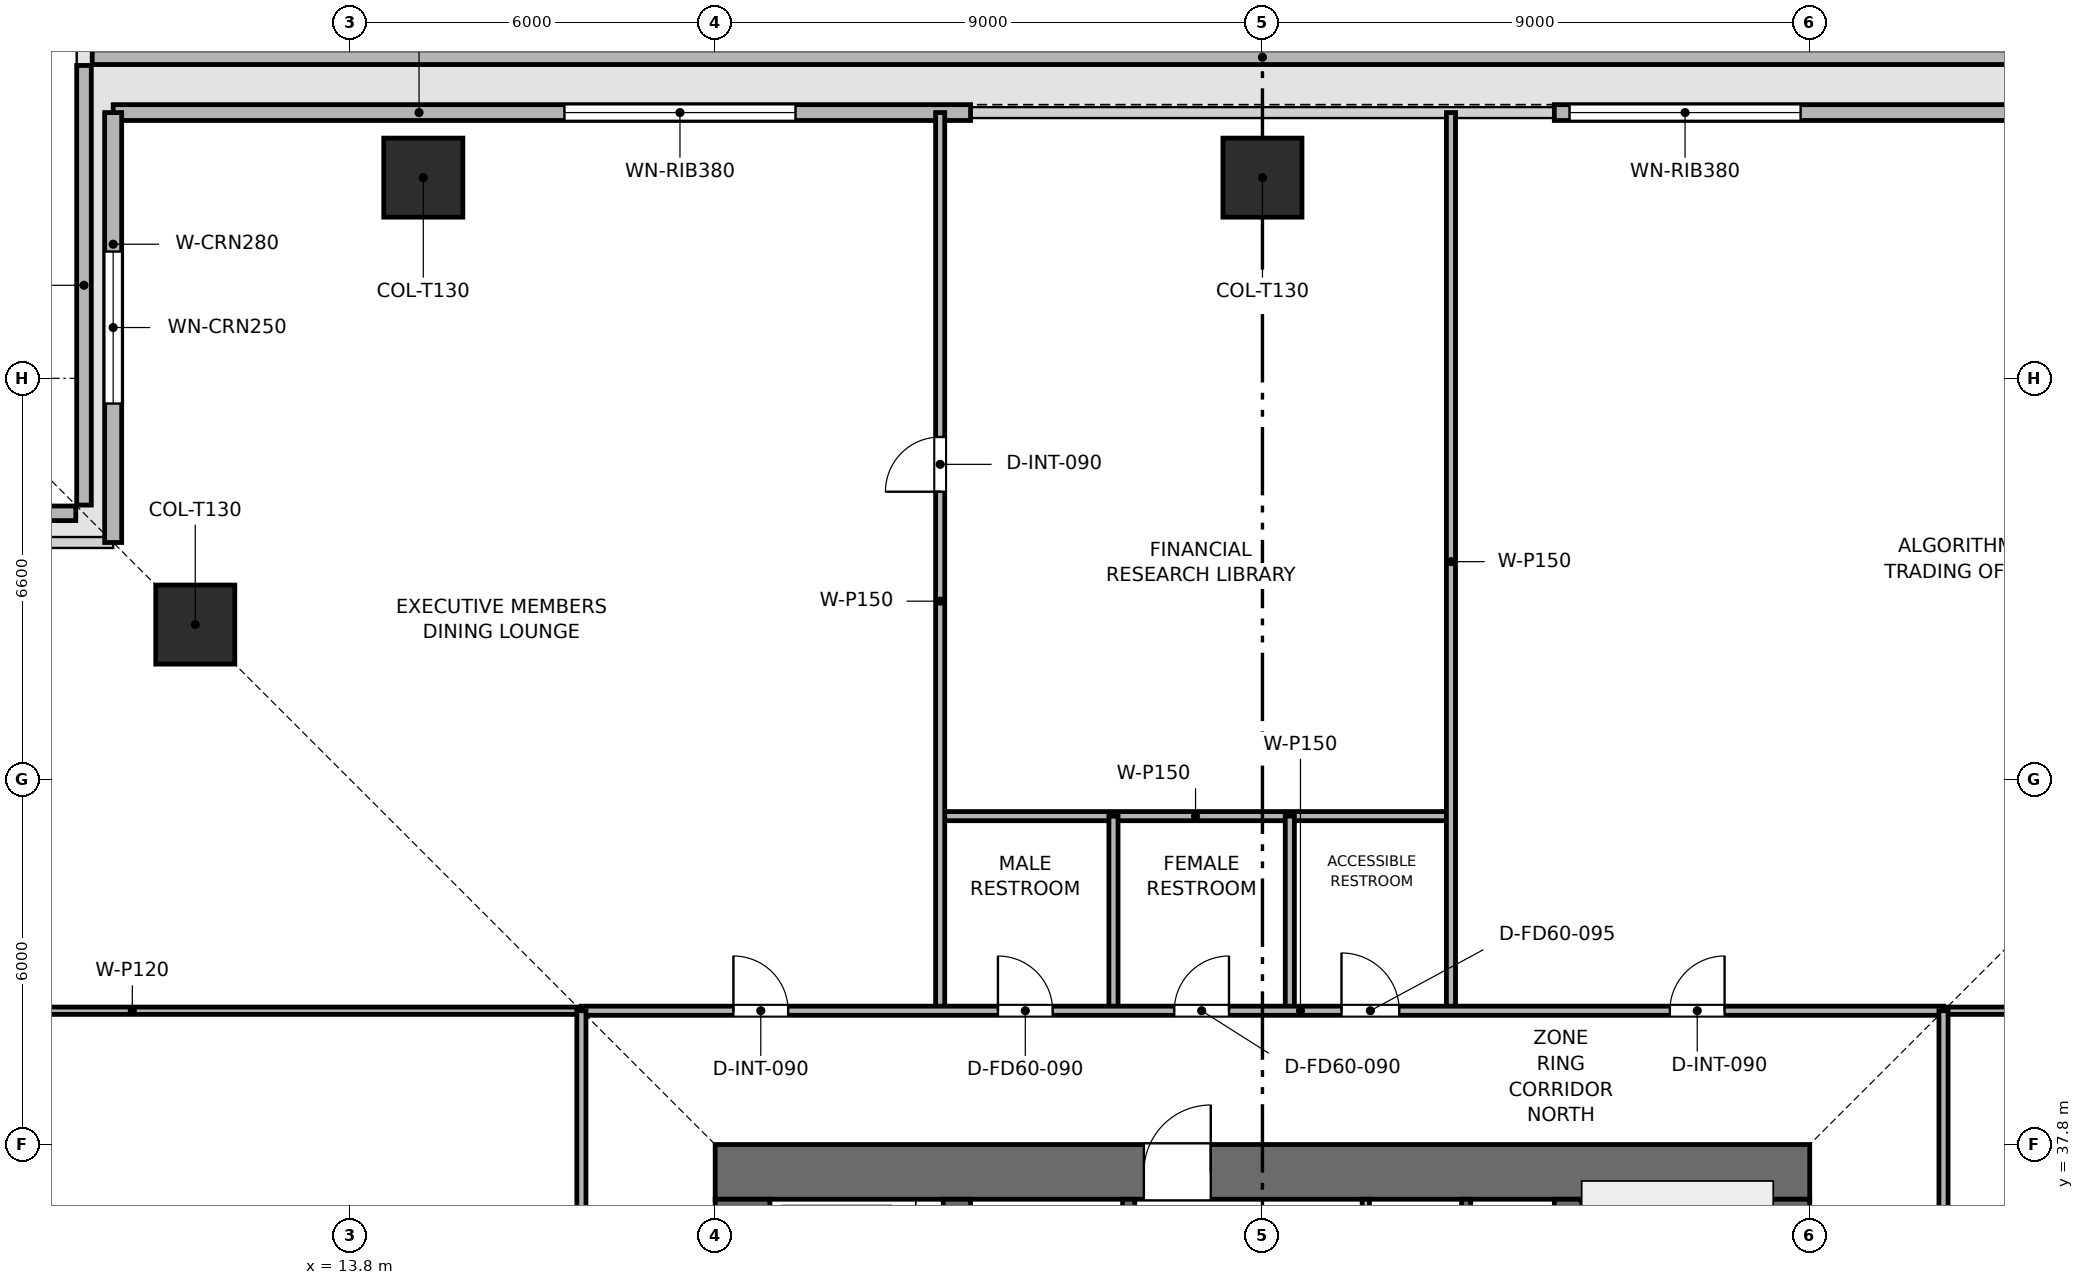
"""IFC4 building model, lengths in metres.
Left out: names, types, materials, properties, quantities, classifications, styles, units other than length and angle.
Written with IfcOpenShell. Run it as: python <this file> out.ifc"""

import sys

from ifc_helpers import new_model, si_unit, direction, frame, frame_2d, origin, origin_2d, place, context, subcontext, project, spatial, rectangle, extrude, element, fill, save


model = new_model("IFC4")
c1 = context("Model", 3, precision=1e-05, world=origin(), true_north=direction((0.0, 1.0)))
c2 = subcontext(c1, "Body", "Model", "MODEL_VIEW")
j1 = project(units=[si_unit("LENGTHUNIT", "METRE"), si_unit("PLANEANGLEUNIT", "RADIAN")], contexts=[c1])
p1 = place(None, origin())
s1 = spatial("IfcSite", under=j1, at=p1, CompositionType="ELEMENT")
p2 = place(p1, origin())
s2 = spatial("IfcBuilding", under=s1, at=p2, CompositionType="ELEMENT")
p3 = place(p2, frame((0.0, 0.0, 113.4)))
s3 = spatial("IfcBuildingStorey", under=s2, at=p3, CompositionType="ELEMENT", Elevation=113.4)
p4 = place(p3, frame((19.8, 37.35, 0.0), z_axis=(0.0, 0.0, 1.0), x_axis=(1.0, 0.0, 0.0)))
e1 = element("IfcWall", 1, at=p4, inside=s3, PredefinedType="SHEAR", context=c2, shape_type="SweptSolid", body=[
    extrude(rectangle(XDim=18.0, YDim=0.9, at=frame_2d((9.0, 0.0))), origin(), (0.0, 0.0, 1.0), 3.9),
])
p5 = place(p4, frame((7.05, 0.0, 0.0)))
e2 = element("IfcOpeningElement", 2, at=p5, cuts=e1, PredefinedType="OPENING", context=c2, shape_type="SweptSolid", body=[
    extrude(rectangle(XDim=1.1, YDim=2.15, at=frame_2d((0.55, 1.075))), frame((0.0, 0.46, 0.0), z_axis=(0.0, -1.0, 0.0), x_axis=(1.0, 0.0, 0.0)), (0.0, 0.0, 1.0), 0.92),
])
p6 = place(p3, frame((20.25, 20.7, 0.0), z_axis=(0.0, 0.0, 1.0), x_axis=(0.0, 1.0, 0.0)))
e3 = element("IfcWall", 3, at=p6, inside=s3, PredefinedType="SHEAR", context=c2, shape_type="SweptSolid", body=[
    extrude(rectangle(XDim=16.2, YDim=0.9, at=frame_2d((8.1, 0.0))), origin(), (0.0, 0.0, 1.0), 3.9),
])
p7 = place(p6, frame((10.1, 0.0, 0.0)))
e4 = element("IfcOpeningElement", 4, at=p7, cuts=e3, PredefinedType="OPENING", context=c2, shape_type="SweptSolid", body=[
    extrude(rectangle(XDim=1.1, YDim=2.15, at=frame_2d((0.55, 1.075))), frame((0.0, 0.46, 0.0), z_axis=(0.0, -1.0, 0.0), x_axis=(1.0, 0.0, 0.0)), (0.0, 0.0, 1.0), 0.92),
])
p8 = place(p3, frame((37.35, 20.7, 0.0), z_axis=(0.0, 0.0, 1.0), x_axis=(0.0, 1.0, 0.0)))
e5 = element("IfcWall", 5, at=p8, inside=s3, PredefinedType="SHEAR", context=c2, shape_type="SweptSolid", body=[
    extrude(rectangle(XDim=16.2, YDim=0.9, at=frame_2d((8.1, 0.0))), origin(), (0.0, 0.0, 1.0), 3.9),
])
p9 = place(p8, frame((4.6, 0.0, 0.0)))
e6 = element("IfcOpeningElement", 6, at=p9, cuts=e5, PredefinedType="OPENING", context=c2, shape_type="SweptSolid", body=[
    extrude(rectangle(XDim=1.1, YDim=2.15, at=frame_2d((0.55, 1.075))), frame((0.0, 0.46, 0.0), z_axis=(0.0, -1.0, 0.0), x_axis=(1.0, 0.0, 0.0)), (0.0, 0.0, 1.0), 0.92),
])
for number, where, z_axis, x_axis in (
    (7, (23.775, 20.7, 0.0), (0.0, 0.0, 1.0), (0.0, 1.0, 0.0)),
    (8, (33.825, 20.7, 0.0), (0.0, 0.0, 1.0), (0.0, 1.0, 0.0)),
):
    element("IfcWall", number, at=place(p3, frame(where, z_axis=z_axis, x_axis=x_axis)), inside=s3, PredefinedType="SHEAR", context=c2, shape_type="SweptSolid", body=[
        extrude(rectangle(XDim=16.2, YDim=0.45, at=frame_2d((8.1, 0.0))), origin(), (0.0, 0.0, 1.0), 3.9),
    ])
for number, where, z_axis, x_axis in (
    (9, (28.8, 53.7, 0.003), (0.0, 0.0, 1.0), (1.0, 0.0, 0.0)),
    (10, (15.0, 53.7, 0.003), (0.0, 0.0, 1.0), (1.0, 0.0, 0.0)),
    (11, (11.25, 46.35, 0.003), (0.0, 0.0, 1.0), (1.0, 0.0, 0.0)),
):
    element("IfcColumn", number, at=place(p3, frame(where, z_axis=z_axis, x_axis=x_axis)), inside=s3, PredefinedType="COLUMN", context=c2, shape_type="SweptSolid", body=[
        extrude(rectangle(XDim=1.3, YDim=1.3, at=origin_2d()), origin(), (0.0, 0.0, 1.0), 3.644),
    ])
p10 = place(p3, frame((48.045, 55.68, 0.0), z_axis=(0.0, 0.0, 1.0), x_axis=(-1.0, 0.0, 0.0)))
e12 = element("IfcWall", 12, at=p10, inside=s3, PredefinedType="PARAPET", context=c2, shape_type="SweptSolid", body=[
    extrude(rectangle(XDim=38.49, YDim=0.24, at=frame_2d((19.245, 0.0))), origin(), (0.0, 0.0, 1.0), 1.2),
])
for number, where, z_axis, x_axis in (
    (13, (9.42, 55.545, 0.0), (0.0, 0.0, 1.0), (0.0, -1.0, 0.0)),
    (14, (9.285, 48.18, 0.0), (0.0, 0.0, 1.0), (-1.0, 0.0, 0.0)),
):
    element("IfcWall", number, at=place(p3, frame(where, z_axis=z_axis, x_axis=x_axis)), inside=s3, PredefinedType="PARAPET", context=c2, shape_type="SweptSolid", body=[
        extrude(rectangle(XDim=7.23, YDim=0.24, at=frame_2d((3.615, 0.0))), origin(), (0.0, 0.0, 1.0), 1.2),
    ])
p11 = place(p3, frame((9.9, 54.77, 0.0), z_axis=(0.0, 0.0, 1.0), x_axis=(1.0, 0.0, 0.0)))
e15 = element("IfcWall", 15, at=p11, inside=s3, PredefinedType="SOLIDWALL", context=c2, shape_type="SweptSolid", body=[
    extrude(rectangle(XDim=14.1, YDim=0.26, at=frame_2d((7.05, 0.0))), origin(), (0.0, 0.0, 1.0), 3.65),
])
p12 = place(p11, frame((7.421, 0.0, 0.9)))
e16 = element("IfcOpeningElement", 16, at=p12, cuts=e15, PredefinedType="OPENING", context=c2, shape_type="SweptSolid", body=[
    extrude(rectangle(XDim=3.8, YDim=1.9, at=frame_2d((1.9, 0.95))), frame((0.0, 0.14, 0.0), z_axis=(0.0, -1.0, 0.0), x_axis=(1.0, 0.0, 0.0)), (0.0, 0.0, 1.0), 0.28),
])
p13 = place(p3, frame((33.6, 54.77, 0.0), z_axis=(0.0, 0.0, 1.0), x_axis=(1.0, 0.0, 0.0)))
e17 = element("IfcWall", 17, at=p13, inside=s3, PredefinedType="SOLIDWALL", context=c2, shape_type="SweptSolid", body=[
    extrude(rectangle(XDim=14.1, YDim=0.26, at=frame_2d((7.05, 0.0))), origin(), (0.0, 0.0, 1.0), 3.65),
])
p14 = place(p13, frame((0.25, 0.0, 0.9)))
e18 = element("IfcOpeningElement", 18, at=p14, cuts=e17, PredefinedType="OPENING", context=c2, shape_type="SweptSolid", body=[
    extrude(rectangle(XDim=3.8, YDim=1.9, at=frame_2d((1.9, 0.95))), frame((0.0, 0.14, 0.0), z_axis=(0.0, -1.0, 0.0), x_axis=(1.0, 0.0, 0.0)), (0.0, 0.0, 1.0), 0.28),
])
p15 = place(p3, frame((9.9, 47.7, 0.0), z_axis=(0.0, 0.0, 1.0), x_axis=(0.0, 1.0, 0.0)))
e19 = element("IfcWall", 19, at=p15, inside=s3, PredefinedType="SOLIDWALL", context=c2, shape_type="SweptSolid", body=[
    extrude(rectangle(XDim=7.07, YDim=0.28, at=frame_2d((3.535, 0.0))), origin(), (0.0, 0.0, 1.0), 3.65),
])
p16 = place(p15, frame((2.285, 0.0, 0.9)))
e20 = element("IfcOpeningElement", 20, at=p16, cuts=e19, PredefinedType="OPENING", context=c2, shape_type="SweptSolid", body=[
    extrude(rectangle(XDim=2.5, YDim=1.9, at=frame_2d((1.25, 0.95))), frame((0.0, 0.15, 0.0), z_axis=(0.0, -1.0, 0.0), x_axis=(1.0, 0.0, 0.0)), (0.0, 0.0, 1.0), 0.3),
])
p17 = place(p3, frame((32.15, 34.0, 0.0), z_axis=(0.0, 0.0, 1.0), x_axis=(0.0, 1.0, 0.0)))
e21 = element("IfcWall", 21, at=p17, inside=s3, PredefinedType="SHEAR", context=c2, shape_type="SweptSolid", body=[
    extrude(rectangle(XDim=2.9, YDim=0.15, at=frame_2d((1.45, 0.0))), origin(), (0.0, 0.0, 1.0), 3.65),
])
p18 = place(p3, frame((26.6, 34.0, 0.0), z_axis=(0.0, 0.0, 1.0), x_axis=(0.0, 1.0, 0.0)))
e22 = element("IfcWall", 22, at=p18, inside=s3, PredefinedType="SHEAR", context=c2, shape_type="SweptSolid", body=[
    extrude(rectangle(XDim=2.9, YDim=0.2, at=frame_2d((1.45, 0.0))), origin(), (0.0, 0.0, 1.0), 3.65),
])
p19 = place(p18, frame((0.75, 0.0, 0.0)))
e23 = element("IfcOpeningElement", 23, at=p19, cuts=e22, PredefinedType="OPENING", context=c2, shape_type="SweptSolid", body=[
    extrude(rectangle(XDim=1.1, YDim=2.15, at=frame_2d((0.55, 1.075))), frame((0.0, 0.11, 0.0), z_axis=(0.0, -1.0, 0.0), x_axis=(1.0, 0.0, 0.0)), (0.0, 0.0, 1.0), 0.22),
])
p20 = place(p3, frame((30.5, 33.925, 0.0), z_axis=(0.0, 0.0, 1.0), x_axis=(0.0, 1.0, 0.0)))
e24 = element("IfcWall", 24, at=p20, inside=s3, PredefinedType="PARTITIONING", context=c2, shape_type="SweptSolid", body=[
    extrude(rectangle(XDim=2.975, YDim=0.12, at=frame_2d((1.487, 0.0))), origin(), (0.0, 0.0, 1.0), 3.65),
])
p21 = place(p20, frame((0.85, 0.0, 0.0)))
e25 = element("IfcOpeningElement", 25, at=p21, cuts=e24, PredefinedType="OPENING", context=c2, shape_type="SweptSolid", body=[
    extrude(rectangle(XDim=0.9, YDim=2.1, at=frame_2d((0.45, 1.05))), frame((0.0, 0.07, 0.0), z_axis=(0.0, -1.0, 0.0), x_axis=(1.0, 0.0, 0.0)), (0.0, 0.0, 1.0), 0.14),
])
p22 = place(p3, frame((23.5, 43.2, 0.0), z_axis=(0.0, 0.0, 1.0), x_axis=(1.0, 0.0, 0.0)))
e26 = element("IfcWall", 26, at=p22, inside=s3, PredefinedType="PARTITIONING", context=c2, shape_type="SweptSolid", body=[
    extrude(rectangle(XDim=8.4, YDim=0.15, at=frame_2d((4.2, 0.0))), origin(), (0.0, 0.0, 1.0), 3.185),
])
p23 = place(p3, frame((23.5, 40.0, 0.0), z_axis=(0.0, 0.0, 1.0), x_axis=(0.0, 1.0, 0.0)))
e27 = element("IfcWall", 27, at=p23, inside=s3, PredefinedType="PARTITIONING", context=c2, shape_type="SweptSolid", body=[
    extrude(rectangle(XDim=14.77, YDim=0.15, at=frame_2d((7.385, 0.0))), origin(), (0.0, 0.0, 1.0), 3.035),
])
p24 = place(p23, frame((8.535, 0.0, 0.0)))
e28 = element("IfcOpeningElement", 28, at=p24, cuts=e27, PredefinedType="OPENING", context=c2, shape_type="SweptSolid", body=[
    extrude(rectangle(XDim=0.9, YDim=2.1, at=frame_2d((0.45, 1.05))), frame((0.0, 0.085, 0.0), z_axis=(0.0, -1.0, 0.0), x_axis=(1.0, 0.0, 0.0)), (0.0, 0.0, 1.0), 0.17),
])
p25 = place(p3, frame((31.9, 40.0, 0.0), z_axis=(0.0, 0.0, 1.0), x_axis=(0.0, 1.0, 0.0)))
e29 = element("IfcWall", 29, at=p25, inside=s3, PredefinedType="PARTITIONING", context=c2, shape_type="SweptSolid", body=[
    extrude(rectangle(XDim=14.77, YDim=0.15, at=frame_2d((7.385, 0.0))), origin(), (0.0, 0.0, 1.0), 3.035),
])
for number, where, z_axis, x_axis in (
    (30, (26.35, 40.0, 0.0), (0.0, 0.0, 1.0), (0.0, 1.0, 0.0)),
    (31, (29.25, 40.0, 0.0), (0.0, 0.0, 1.0), (0.0, 1.0, 0.0)),
):
    element("IfcWall", number, at=place(p3, frame(where, z_axis=z_axis, x_axis=x_axis)), inside=s3, PredefinedType="PARTITIONING", context=c2, shape_type="SweptSolid", body=[
        extrude(rectangle(XDim=3.2, YDim=0.15, at=frame_2d((1.6, 0.0))), origin(), (0.0, 0.0, 1.0), 3.65),
    ])
for number, where, z_axis, x_axis in (
    (32, (2.83, 40.0, 0.0), (0.0, 0.0, 1.0), (1.0, 0.0, 0.0)),
    (33, (40.0, 40.0, 0.0), (0.0, 0.0, 1.0), (1.0, 0.0, 0.0)),
):
    element("IfcWall", number, at=place(p3, frame(where, z_axis=z_axis, x_axis=x_axis)), inside=s3, PredefinedType="PARTITIONING", context=c2, shape_type="SweptSolid", body=[
        extrude(rectangle(XDim=14.77, YDim=0.12, at=frame_2d((7.385, 0.0))), origin(), (0.0, 0.0, 1.0), 3.035),
    ])
p26 = place(p3, frame((17.6, 40.0, 0.0), z_axis=(0.0, 0.0, 1.0), x_axis=(1.0, 0.0, 0.0)))
e34 = element("IfcWall", 34, at=p26, inside=s3, PredefinedType="PARTITIONING", context=c2, shape_type="SweptSolid", body=[
    extrude(rectangle(XDim=22.4, YDim=0.15, at=frame_2d((11.2, 0.0))), origin(), (0.0, 0.0, 1.0), 3.185),
])
p27 = place(p26, frame((2.5, 0.0, 0.0)))
e35 = element("IfcOpeningElement", 35, at=p27, cuts=e34, PredefinedType="OPENING", context=c2, shape_type="SweptSolid", body=[
    extrude(rectangle(XDim=0.9, YDim=2.1, at=frame_2d((0.45, 1.05))), frame((0.0, 0.085, 0.0), z_axis=(0.0, -1.0, 0.0), x_axis=(1.0, 0.0, 0.0)), (0.0, 0.0, 1.0), 0.17),
])
p28 = place(p26, frame((6.85, 0.0, 0.0)))
e36 = element("IfcOpeningElement", 36, at=p28, cuts=e34, PredefinedType="OPENING", context=c2, shape_type="SweptSolid", body=[
    extrude(rectangle(XDim=0.9, YDim=2.1, at=frame_2d((0.45, 1.05))), frame((0.0, 0.085, 0.0), z_axis=(0.0, -1.0, 0.0), x_axis=(1.0, 0.0, 0.0)), (0.0, 0.0, 1.0), 0.17),
])
p29 = place(p26, frame((9.75, 0.0, 0.0)))
e37 = element("IfcOpeningElement", 37, at=p29, cuts=e34, PredefinedType="OPENING", context=c2, shape_type="SweptSolid", body=[
    extrude(rectangle(XDim=0.9, YDim=2.1, at=frame_2d((0.45, 1.05))), frame((0.0, 0.085, 0.0), z_axis=(0.0, -1.0, 0.0), x_axis=(1.0, 0.0, 0.0)), (0.0, 0.0, 1.0), 0.17),
])
p30 = place(p26, frame((12.5, 0.0, 0.0)))
e38 = element("IfcOpeningElement", 38, at=p30, cuts=e34, PredefinedType="OPENING", context=c2, shape_type="SweptSolid", body=[
    extrude(rectangle(XDim=0.95, YDim=2.1, at=frame_2d((0.475, 1.05))), frame((0.0, 0.085, 0.0), z_axis=(0.0, -1.0, 0.0), x_axis=(1.0, 0.0, 0.0)), (0.0, 0.0, 1.0), 0.17),
])
p31 = place(p26, frame((17.9, 0.0, 0.0)))
e39 = element("IfcOpeningElement", 39, at=p31, cuts=e34, PredefinedType="OPENING", context=c2, shape_type="SweptSolid", body=[
    extrude(rectangle(XDim=0.9, YDim=2.1, at=frame_2d((0.45, 1.05))), frame((0.0, 0.085, 0.0), z_axis=(0.0, -1.0, 0.0), x_axis=(1.0, 0.0, 0.0)), (0.0, 0.0, 1.0), 0.17),
])
p32 = place(p3, frame((17.6, 17.6, 0.0), z_axis=(0.0, 0.0, 1.0), x_axis=(0.0, 1.0, 0.0)))
e40 = element("IfcWall", 40, at=p32, inside=s3, PredefinedType="PARTITIONING", context=c2, shape_type="SweptSolid", body=[
    extrude(rectangle(XDim=22.4, YDim=0.15, at=frame_2d((11.2, 0.0))), origin(), (0.0, 0.0, 1.0), 3.185),
])
p33 = place(p32, frame((4.616, 0.0, 0.0)))
e41 = element("IfcOpeningElement", 41, at=p33, cuts=e40, PredefinedType="OPENING", context=c2, shape_type="SweptSolid", body=[
    extrude(rectangle(XDim=0.9, YDim=2.1, at=frame_2d((0.45, 1.05))), frame((0.0, 0.085, 0.0), z_axis=(0.0, -1.0, 0.0), x_axis=(1.0, 0.0, 0.0)), (0.0, 0.0, 1.0), 0.17),
])
p34 = place(p32, frame((15.816, 0.0, 0.0)))
e42 = element("IfcOpeningElement", 42, at=p34, cuts=e40, PredefinedType="OPENING", context=c2, shape_type="SweptSolid", body=[
    extrude(rectangle(XDim=0.9, YDim=2.1, at=frame_2d((0.45, 1.05))), frame((0.0, 0.085, 0.0), z_axis=(0.0, -1.0, 0.0), x_axis=(1.0, 0.0, 0.0)), (0.0, 0.0, 1.0), 0.17),
])
p35 = place(p3, frame((40.0, 17.6, 0.0), z_axis=(0.0, 0.0, 1.0), x_axis=(0.0, 1.0, 0.0)))
e43 = element("IfcWall", 43, at=p35, inside=s3, PredefinedType="PARTITIONING", context=c2, shape_type="SweptSolid", body=[
    extrude(rectangle(XDim=22.4, YDim=0.15, at=frame_2d((11.2, 0.0))), origin(), (0.0, 0.0, 1.0), 3.185),
])
p36 = place(p35, frame((10.75, 0.0, 0.0)))
e44 = element("IfcOpeningElement", 44, at=p36, cuts=e43, PredefinedType="OPENING", context=c2, shape_type="SweptSolid", body=[
    extrude(rectangle(XDim=0.9, YDim=2.1, at=frame_2d((0.45, 1.05))), frame((0.0, 0.085, 0.0), z_axis=(0.0, -1.0, 0.0), x_axis=(1.0, 0.0, 0.0)), (0.0, 0.0, 1.0), 0.17),
])
p37 = place(p12, origin())
e45 = element("IfcWindow", 45, at=p37, inside=s3, PartitioningType="SINGLE_PANEL", PredefinedType="WINDOW", context=c2, shape_type="SweptSolid", body=[
    extrude(rectangle(XDim=3.8, YDim=1.9, at=frame_2d((1.9, 0.95))), frame((0.0, 0.03, 0.0), z_axis=(0.0, -1.0, 0.0), x_axis=(1.0, 0.0, 0.0)), (0.0, 0.0, 1.0), 0.06),
])
fill(e16, e45)
p38 = place(p14, origin())
e46 = element("IfcWindow", 46, at=p38, inside=s3, PartitioningType="SINGLE_PANEL", PredefinedType="WINDOW", context=c2, shape_type="SweptSolid", body=[
    extrude(rectangle(XDim=3.8, YDim=1.9, at=frame_2d((1.9, 0.95))), frame((0.0, 0.03, 0.0), z_axis=(0.0, -1.0, 0.0), x_axis=(1.0, 0.0, 0.0)), (0.0, 0.0, 1.0), 0.06),
])
fill(e18, e46)
p39 = place(p16, origin())
e47 = element("IfcWindow", 47, at=p39, inside=s3, PartitioningType="SINGLE_PANEL", PredefinedType="WINDOW", context=c2, shape_type="SweptSolid", body=[
    extrude(rectangle(XDim=2.5, YDim=1.9, at=frame_2d((1.25, 0.95))), frame((0.0, 0.03, 0.0), z_axis=(0.0, -1.0, 0.0), x_axis=(1.0, 0.0, 0.0)), (0.0, 0.0, 1.0), 0.06),
])
fill(e20, e47)
p40 = place(p24, origin())
e48 = element("IfcDoor", 48, at=p40, inside=s3, OperationType="SINGLE_SWING_LEFT", PredefinedType="DOOR", context=c2, shape_type="SweptSolid", body=[
    extrude(rectangle(XDim=0.9, YDim=2.1, at=frame_2d((0.45, 1.05))), frame((0.0, 0.025, 0.0), z_axis=(0.0, -1.0, 0.0), x_axis=(1.0, 0.0, 0.0)), (0.0, 0.0, 1.0), 0.05),
])
fill(e28, e48)
p41 = place(p27, origin())
e49 = element("IfcDoor", 49, at=p41, inside=s3, OperationType="SINGLE_SWING_LEFT", PredefinedType="DOOR", context=c2, shape_type="SweptSolid", body=[
    extrude(rectangle(XDim=0.9, YDim=2.1, at=frame_2d((0.45, 1.05))), frame((0.0, 0.025, 0.0), z_axis=(0.0, -1.0, 0.0), x_axis=(1.0, 0.0, 0.0)), (0.0, 0.0, 1.0), 0.05),
])
fill(e35, e49)
p42 = place(p28, origin())
e50 = element("IfcDoor", 50, at=p42, inside=s3, OperationType="SINGLE_SWING_LEFT", PredefinedType="DOOR", context=c2, shape_type="SweptSolid", body=[
    extrude(rectangle(XDim=0.9, YDim=2.1, at=frame_2d((0.45, 1.05))), frame((0.0, 0.025, 0.0), z_axis=(0.0, -1.0, 0.0), x_axis=(1.0, 0.0, 0.0)), (0.0, 0.0, 1.0), 0.05),
])
fill(e36, e50)
p43 = place(p29, origin())
e51 = element("IfcDoor", 51, at=p43, inside=s3, OperationType="SINGLE_SWING_RIGHT", PredefinedType="DOOR", context=c2, shape_type="SweptSolid", body=[
    extrude(rectangle(XDim=0.9, YDim=2.1, at=frame_2d((0.45, 1.05))), frame((0.0, 0.025, 0.0), z_axis=(0.0, -1.0, 0.0), x_axis=(1.0, 0.0, 0.0)), (0.0, 0.0, 1.0), 0.05),
])
fill(e37, e51)
p44 = place(p30, origin())
e52 = element("IfcDoor", 52, at=p44, inside=s3, OperationType="SINGLE_SWING_LEFT", PredefinedType="DOOR", context=c2, shape_type="SweptSolid", body=[
    extrude(rectangle(XDim=0.95, YDim=2.1, at=frame_2d((0.475, 1.05))), frame((0.0, 0.025, 0.0), z_axis=(0.0, -1.0, 0.0), x_axis=(1.0, 0.0, 0.0)), (0.0, 0.0, 1.0), 0.05),
])
fill(e38, e52)
p45 = place(p31, origin())
e53 = element("IfcDoor", 53, at=p45, inside=s3, OperationType="SINGLE_SWING_RIGHT", PredefinedType="DOOR", context=c2, shape_type="SweptSolid", body=[
    extrude(rectangle(XDim=0.9, YDim=2.1, at=frame_2d((0.45, 1.05))), frame((0.0, 0.025, 0.0), z_axis=(0.0, -1.0, 0.0), x_axis=(1.0, 0.0, 0.0)), (0.0, 0.0, 1.0), 0.05),
])
fill(e39, e53)
p46 = place(p5, origin())
e54 = element("IfcDoor", 54, at=p46, inside=s3, OperationType="SINGLE_SWING_RIGHT", PredefinedType="DOOR", context=c2, shape_type="SweptSolid", body=[
    extrude(rectangle(XDim=1.1, YDim=2.15, at=frame_2d((0.55, 1.075))), frame((0.0, 0.025, 0.0), z_axis=(0.0, -1.0, 0.0), x_axis=(1.0, 0.0, 0.0)), (0.0, 0.0, 1.0), 0.05),
])
fill(e2, e54)
save(model, sys.argv[1])
